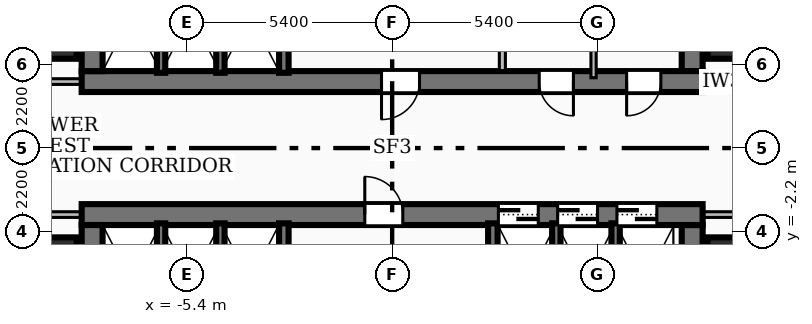
"""IFC4 building model, lengths in metres.
Left out: names, types, materials, properties, quantities, classifications, styles, units other than length and angle.
Written with IfcOpenShell. Run it as: python <this file> out.ifc"""

import sys

from ifc_helpers import new_model, si_unit, direction, frame, frame_2d, origin, origin_2d, place, context, subcontext, project, spatial, rectangle, extrude, element, fill, save


model = new_model("IFC4")
c1 = context("Model", 3, precision=1e-05, world=origin(), true_north=direction((0.0, 1.0)))
c2 = subcontext(c1, "Body", "Model", "MODEL_VIEW")
j1 = project(units=[si_unit("LENGTHUNIT", "METRE"), si_unit("PLANEANGLEUNIT", "RADIAN")], contexts=[c1])
p1 = place(None, origin())
s1 = spatial("IfcSite", under=j1, at=p1, CompositionType="ELEMENT")
p2 = place(p1, origin())
s2 = spatial("IfcBuilding", under=s1, at=p2, CompositionType="ELEMENT")
p3 = place(p2, frame((0.0, 0.0, 24.48)))
s3 = spatial("IfcBuildingStorey", under=s2, at=p3, CompositionType="ELEMENT", Elevation=24.48)
p4 = place(p3, frame((8.17, 1.75, 0.0), z_axis=(0.0, 0.0, 1.0), x_axis=(-1.0, 0.0, 0.0)))
e1 = element("IfcWall", 1, at=p4, inside=s3, PredefinedType="SHEAR", context=c2, shape_type="SweptSolid", body=[
    extrude(rectangle(XDim=16.34, YDim=0.55, at=frame_2d((8.17, 0.0))), origin(), (0.0, 0.0, 1.0), 3.34),
])
p5 = place(p4, frame((7.45, 0.0, 0.0)))
e2 = element("IfcOpeningElement", 2, at=p5, cuts=e1, PredefinedType="OPENING", context=c2, shape_type="SweptSolid", body=[
    extrude(rectangle(XDim=1.0, YDim=2.1, at=frame_2d((0.5, 1.05))), frame((0.0, 0.285, 0.0), z_axis=(0.0, -1.0, 0.0), x_axis=(1.0, 0.0, 0.0)), (0.0, 0.0, 1.0), 0.57),
])
p6 = place(p4, frame((3.4, 0.0, 0.0)))
e3 = element("IfcOpeningElement", 3, at=p6, cuts=e1, PredefinedType="OPENING", context=c2, shape_type="SweptSolid", body=[
    extrude(rectangle(XDim=0.9, YDim=2.06, at=frame_2d((0.45, 1.03))), frame((0.0, 0.285, 0.0), z_axis=(0.0, -1.0, 0.0), x_axis=(1.0, 0.0, 0.0)), (0.0, 0.0, 1.0), 0.57),
])
p7 = place(p4, frame((1.1, 0.0, 0.0)))
e4 = element("IfcOpeningElement", 4, at=p7, cuts=e1, PredefinedType="OPENING", context=c2, shape_type="SweptSolid", body=[
    extrude(rectangle(XDim=0.9, YDim=2.06, at=frame_2d((0.45, 1.03))), frame((0.0, 0.285, 0.0), z_axis=(0.0, -1.0, 0.0), x_axis=(1.0, 0.0, 0.0)), (0.0, 0.0, 1.0), 0.57),
])
for number, where, z_axis, x_axis in (
    (5, (-7.895, 2.025, 0.0), (0.0, 0.0, 1.0), (0.0, 1.0, 0.0)),
    (6, (7.895, 8.31, 0.0), (0.0, 0.0, 1.0), (0.0, -1.0, 0.0)),
):
    element("IfcWall", number, at=place(p3, frame(where, z_axis=z_axis, x_axis=x_axis)), inside=s3, PredefinedType="SHEAR", context=c2, shape_type="SweptSolid", body=[
        extrude(rectangle(XDim=6.285, YDim=0.55, at=frame_2d((3.143, 0.0))), origin(), (0.0, 0.0, 1.0), 3.34),
    ])
p8 = place(p3, frame((-8.17, -1.75, 0.0), z_axis=(0.0, 0.0, 1.0), x_axis=(1.0, 0.0, 0.0)))
e7 = element("IfcWall", 7, at=p8, inside=s3, PredefinedType="SHEAR", context=c2, shape_type="SweptSolid", body=[
    extrude(rectangle(XDim=16.34, YDim=0.55, at=frame_2d((8.17, 0.0))), origin(), (0.0, 0.0, 1.0), 3.34),
])
p9 = place(p8, frame((7.45, 0.0, 0.0)))
e8 = element("IfcOpeningElement", 8, at=p9, cuts=e7, PredefinedType="OPENING", context=c2, shape_type="SweptSolid", body=[
    extrude(rectangle(XDim=1.0, YDim=2.1, at=frame_2d((0.5, 1.05))), frame((0.0, 0.285, 0.0), z_axis=(0.0, -1.0, 0.0), x_axis=(1.0, 0.0, 0.0)), (0.0, 0.0, 1.0), 0.57),
])
p10 = place(p8, frame((10.965, 0.0, 0.0)))
e9 = element("IfcOpeningElement", 9, at=p10, cuts=e7, PredefinedType="OPENING", context=c2, shape_type="SweptSolid", body=[
    extrude(rectangle(XDim=1.05, YDim=2.15, at=frame_2d((0.525, 1.075))), frame((0.0, 0.285, 0.0), z_axis=(0.0, -1.0, 0.0), x_axis=(1.0, 0.0, 0.0)), (0.0, 0.0, 1.0), 0.57),
])
p11 = place(p8, frame((12.525, 0.0, 0.0)))
e10 = element("IfcOpeningElement", 10, at=p11, cuts=e7, PredefinedType="OPENING", context=c2, shape_type="SweptSolid", body=[
    extrude(rectangle(XDim=1.05, YDim=2.15, at=frame_2d((0.525, 1.075))), frame((0.0, 0.285, 0.0), z_axis=(0.0, -1.0, 0.0), x_axis=(1.0, 0.0, 0.0)), (0.0, 0.0, 1.0), 0.57),
])
p12 = place(p8, frame((14.085, 0.0, 0.0)))
e11 = element("IfcOpeningElement", 11, at=p12, cuts=e7, PredefinedType="OPENING", context=c2, shape_type="SweptSolid", body=[
    extrude(rectangle(XDim=1.05, YDim=2.15, at=frame_2d((0.525, 1.075))), frame((0.0, 0.285, 0.0), z_axis=(0.0, -1.0, 0.0), x_axis=(1.0, 0.0, 0.0)), (0.0, 0.0, 1.0), 0.57),
])
for number, where, z_axis, x_axis in (
    (12, (-7.895, -8.31, 0.0), (0.0, 0.0, 1.0), (0.0, 1.0, 0.0)),
    (13, (7.895, -2.025, 0.0), (0.0, 0.0, 1.0), (0.0, -1.0, 0.0)),
):
    element("IfcWall", number, at=place(p3, frame(where, z_axis=z_axis, x_axis=x_axis)), inside=s3, PredefinedType="SHEAR", context=c2, shape_type="SweptSolid", body=[
        extrude(rectangle(XDim=6.285, YDim=0.55, at=frame_2d((3.143, 0.0))), origin(), (0.0, 0.0, 1.0), 3.34),
    ])
for number, where, z_axis, x_axis in (
    (14, (-2.85, 1.98, 0.0), (0.0, 0.0, 1.0), (0.0, 1.0, 0.0)),
    (15, (-2.85, -5.05, 0.0), (0.0, 0.0, 1.0), (0.0, 1.0, 0.0)),
    (16, (2.65, -5.05, 0.0), (0.0, 0.0, 1.0), (0.0, 1.0, 0.0)),
):
    element("IfcWall", number, at=place(p3, frame(where, z_axis=z_axis, x_axis=x_axis)), inside=s3, PredefinedType="SOLIDWALL", context=c2, shape_type="SweptSolid", body=[
        extrude(rectangle(XDim=3.07, YDim=0.25, at=frame_2d((1.535, 0.0))), origin(), (0.0, 0.0, 1.0), 3.34),
    ])
for number, where, z_axis, x_axis in (
    (17, (-6.08, 1.98, 0.0), (0.0, 0.0, 1.0), (0.0, 1.0, 0.0)),
    (18, (-4.52, 1.98, 0.0), (0.0, 0.0, 1.0), (0.0, 1.0, 0.0)),
    (19, (4.32, -5.05, 0.0), (0.0, 0.0, 1.0), (0.0, 1.0, 0.0)),
    (20, (5.88, -5.05, 0.0), (0.0, 0.0, 1.0), (0.0, 1.0, 0.0)),
    (21, (-6.08, -5.05, 0.0), (0.0, 0.0, 1.0), (0.0, 1.0, 0.0)),
    (22, (-4.52, -5.05, 0.0), (0.0, 0.0, 1.0), (0.0, 1.0, 0.0)),
):
    element("IfcWall", number, at=place(p3, frame(where, z_axis=z_axis, x_axis=x_axis)), inside=s3, PredefinedType="SOLIDWALL", context=c2, shape_type="SweptSolid", body=[
        extrude(rectangle(XDim=3.07, YDim=0.22, at=frame_2d((1.535, 0.0))), origin(), (0.0, 0.0, 1.0), 3.34),
    ])
for number, where, z_axis, x_axis in (
    (23, (-8.85, -2.9, 0.0), (0.0, 0.0, 1.0), (1.0, 0.0, 0.0)),
    (24, (-8.85, 2.9, 0.0), (0.0, 0.0, 1.0), (1.0, 0.0, 0.0)),
    (25, (8.85, -2.9, 0.0), (0.0, 0.0, 1.0), (1.0, 0.0, 0.0)),
    (26, (8.85, 2.9, 0.0), (0.0, 0.0, 1.0), (1.0, 0.0, 0.0)),
):
    element("IfcColumn", number, at=place(p3, frame(where, z_axis=z_axis, x_axis=x_axis)), inside=s3, PredefinedType="COLUMN", context=c2, shape_type="SweptSolid", body=[
        extrude(rectangle(XDim=1.1, YDim=1.1, at=origin_2d()), origin(), (0.0, 0.0, 1.0), 3.6),
    ])
p13 = place(p3, frame((2.9, 2.04, 0.0), z_axis=(0.0, 0.0, 1.0), x_axis=(0.0, 1.0, 0.0)))
e27 = element("IfcWall", 27, at=p13, inside=s3, PredefinedType="PARTITIONING", context=c2, shape_type="SweptSolid", body=[
    extrude(rectangle(XDim=2.94, YDim=0.16, at=frame_2d((1.47, 0.0))), origin(), (0.0, 0.0, 1.0), 2.405),
])
p14 = place(p13, frame((1.82, 0.0, 0.0)))
e28 = element("IfcOpeningElement", 28, at=p14, cuts=e27, PredefinedType="OPENING", context=c2, shape_type="SweptSolid", body=[
    extrude(rectangle(XDim=0.9, YDim=2.06, at=frame_2d((0.45, 1.03))), frame((0.0, 0.09, 0.0), z_axis=(0.0, -1.0, 0.0), x_axis=(1.0, 0.0, 0.0)), (0.0, 0.0, 1.0), 0.18),
])
p15 = place(p3, frame((5.3, 1.85, 0.0), z_axis=(0.0, 0.0, 1.0), x_axis=(0.0, 1.0, 0.0)))
e29 = element("IfcWall", 29, at=p15, inside=s3, PredefinedType="PARTITIONING", context=c2, shape_type="SweptSolid", body=[
    extrude(rectangle(XDim=1.89, YDim=0.138, at=frame_2d((0.945, 0.0))), origin(), (0.0, 0.0, 1.0), 2.405),
])
for number, where, z_axis, x_axis in (
    (30, (-7.85, 1.75, 0.0), (0.0, 0.0, 1.0), (-1.0, 0.0, 0.0)),
    (31, (-7.85, -1.75, 0.0), (0.0, 0.0, 1.0), (-1.0, 0.0, 0.0)),
    (32, (7.85, 1.75, 0.0), (0.0, 0.0, 1.0), (1.0, 0.0, 0.0)),
    (33, (7.85, -1.75, 0.0), (0.0, 0.0, 1.0), (1.0, 0.0, 0.0)),
):
    element("IfcWall", number, at=place(p3, frame(where, z_axis=z_axis, x_axis=x_axis)), inside=s3, PredefinedType="PARTITIONING", context=c2, shape_type="SweptSolid", body=[
        extrude(rectangle(XDim=1.67, YDim=0.15, at=frame_2d((0.835, 0.0))), origin(), (0.0, 0.0, 1.0), 2.405),
    ])
p16 = place(p5, origin())
e34 = element("IfcDoor", 34, at=p16, inside=s3, OperationType="SINGLE_SWING_RIGHT", PredefinedType="DOOR", context=c2, shape_type="SweptSolid", body=[
    extrude(rectangle(XDim=1.0, YDim=2.1, at=frame_2d((0.5, 1.05))), frame((0.0, 0.025, 0.0), z_axis=(0.0, -1.0, 0.0), x_axis=(1.0, 0.0, 0.0)), (0.0, 0.0, 1.0), 0.05),
])
fill(e2, e34)
p17 = place(p9, origin())
e35 = element("IfcDoor", 35, at=p17, inside=s3, OperationType="SINGLE_SWING_LEFT", PredefinedType="DOOR", context=c2, shape_type="SweptSolid", body=[
    extrude(rectangle(XDim=1.0, YDim=2.1, at=frame_2d((0.5, 1.05))), frame((0.0, 0.025, 0.0), z_axis=(0.0, -1.0, 0.0), x_axis=(1.0, 0.0, 0.0)), (0.0, 0.0, 1.0), 0.05),
])
fill(e8, e35)
p18 = place(p10, origin())
e36 = element("IfcDoor", 36, at=p18, inside=s3, OperationType="DOUBLE_DOOR_SLIDING", PredefinedType="DOOR", context=c2, shape_type="SweptSolid", body=[
    extrude(rectangle(XDim=1.05, YDim=2.15, at=frame_2d((0.525, 1.075))), frame((0.0, 0.025, 0.0), z_axis=(0.0, -1.0, 0.0), x_axis=(1.0, 0.0, 0.0)), (0.0, 0.0, 1.0), 0.05),
])
fill(e9, e36)
p19 = place(p11, origin())
e37 = element("IfcDoor", 37, at=p19, inside=s3, OperationType="DOUBLE_DOOR_SLIDING", PredefinedType="DOOR", context=c2, shape_type="SweptSolid", body=[
    extrude(rectangle(XDim=1.05, YDim=2.15, at=frame_2d((0.525, 1.075))), frame((0.0, 0.025, 0.0), z_axis=(0.0, -1.0, 0.0), x_axis=(1.0, 0.0, 0.0)), (0.0, 0.0, 1.0), 0.05),
])
fill(e10, e37)
p20 = place(p12, origin())
e38 = element("IfcDoor", 38, at=p20, inside=s3, OperationType="DOUBLE_DOOR_SLIDING", PredefinedType="DOOR", context=c2, shape_type="SweptSolid", body=[
    extrude(rectangle(XDim=1.05, YDim=2.15, at=frame_2d((0.525, 1.075))), frame((0.0, 0.025, 0.0), z_axis=(0.0, -1.0, 0.0), x_axis=(1.0, 0.0, 0.0)), (0.0, 0.0, 1.0), 0.05),
])
fill(e11, e38)
p21 = place(p6, origin())
e39 = element("IfcDoor", 39, at=p21, inside=s3, OperationType="SINGLE_SWING_LEFT", PredefinedType="DOOR", context=c2, shape_type="SweptSolid", body=[
    extrude(rectangle(XDim=0.9, YDim=2.06, at=frame_2d((0.45, 1.03))), frame((0.0, 0.025, 0.0), z_axis=(0.0, -1.0, 0.0), x_axis=(1.0, 0.0, 0.0)), (0.0, 0.0, 1.0), 0.05),
])
fill(e3, e39)
p22 = place(p7, origin())
e40 = element("IfcDoor", 40, at=p22, inside=s3, OperationType="SINGLE_SWING_RIGHT", PredefinedType="DOOR", context=c2, shape_type="SweptSolid", body=[
    extrude(rectangle(XDim=0.9, YDim=2.06, at=frame_2d((0.45, 1.03))), frame((0.0, 0.025, 0.0), z_axis=(0.0, -1.0, 0.0), x_axis=(1.0, 0.0, 0.0)), (0.0, 0.0, 1.0), 0.05),
])
fill(e4, e40)
save(model, sys.argv[1])
